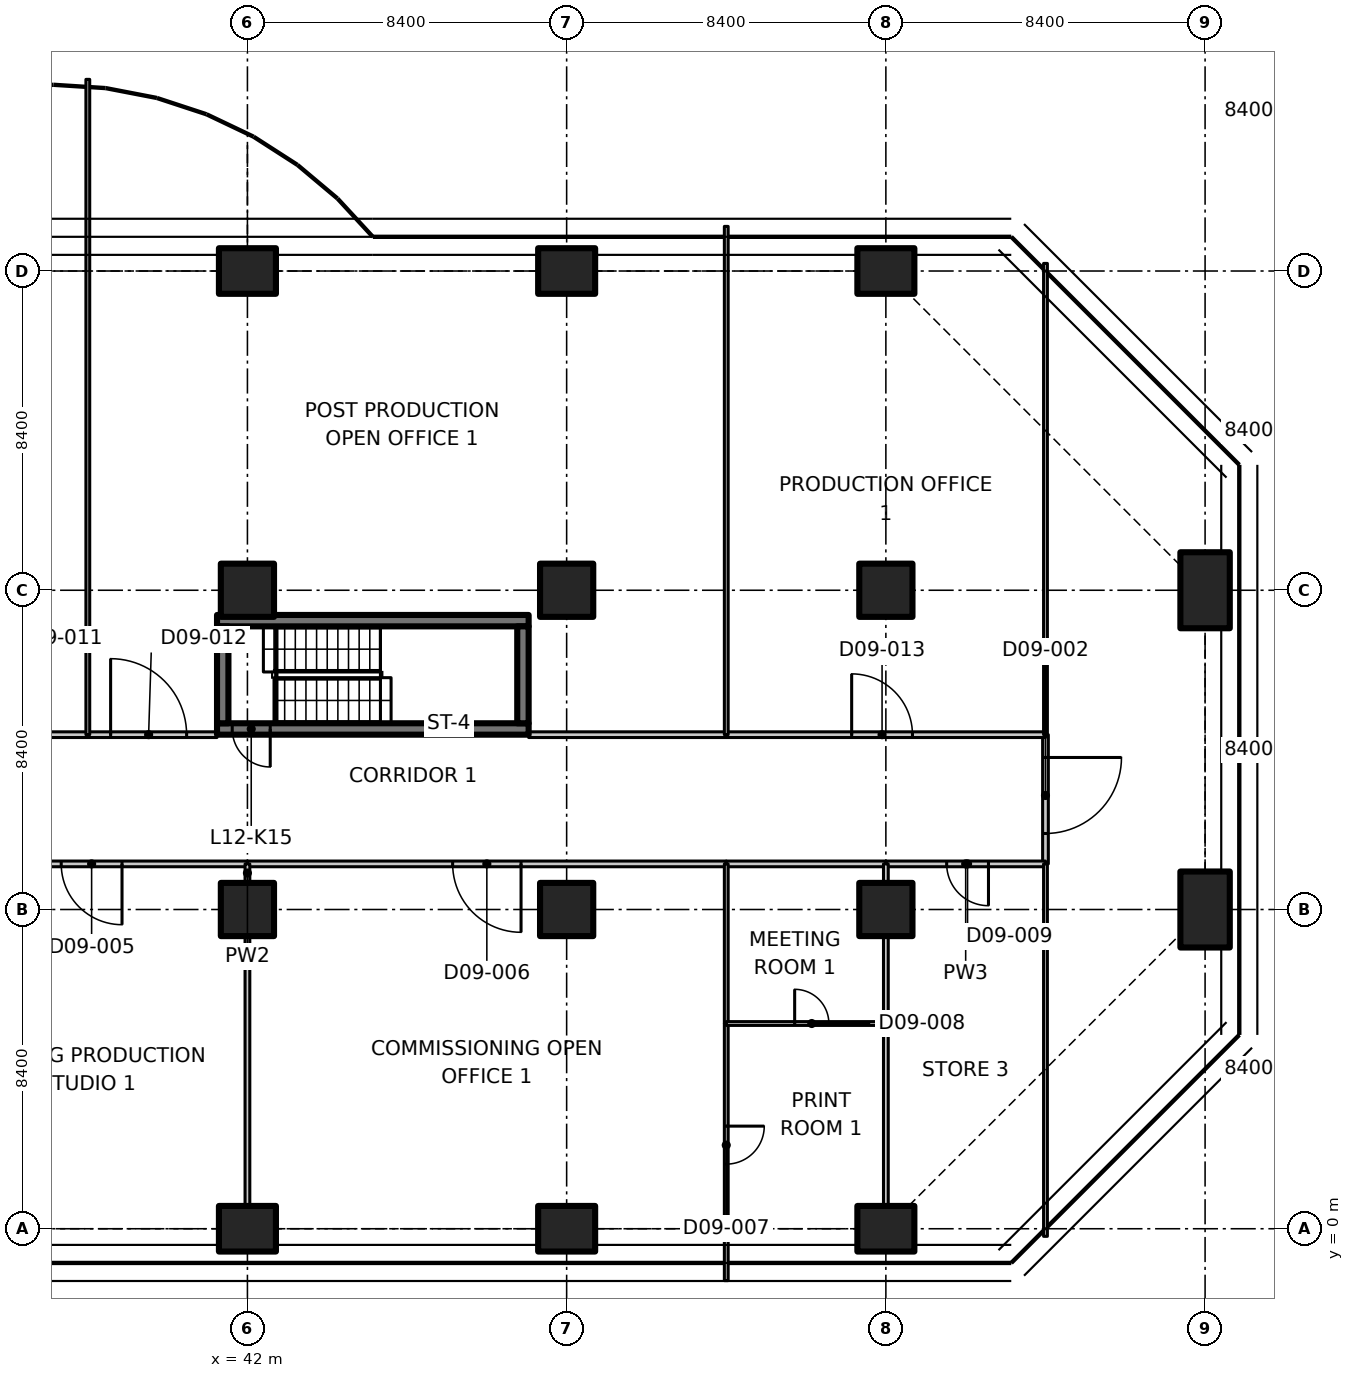
"""IFC4 building model, lengths in metres.
Left out: names, types, materials, properties, quantities, classifications, styles, units other than length and angle.
Written with IfcOpenShell. Run it as: python <this file> out.ifc"""

import sys

from ifc_helpers import new_model, si_unit, direction, frame, frame_2d, origin, origin_2d, place, context, subcontext, project, spatial, polyline, rectangle, outline, extrude, element, fill, save


model = new_model("IFC4")
c1 = context("Model", 3, precision=1e-05, world=origin(), true_north=direction((0.0, 1.0)))
c2 = subcontext(c1, "Body", "Model", "MODEL_VIEW")
j1 = project(units=[si_unit("LENGTHUNIT", "METRE"), si_unit("PLANEANGLEUNIT", "RADIAN")], contexts=[c1])
p1 = place(None, origin())
s1 = spatial("IfcSite", under=j1, at=p1, CompositionType="ELEMENT")
p2 = place(p1, origin())
s2 = spatial("IfcBuilding", under=s1, at=p2, CompositionType="ELEMENT")
p3 = place(p2, frame((0.0, 0.0, 58.1)))
s3 = spatial("IfcBuildingStorey", under=s2, at=p3, CompositionType="ELEMENT", Elevation=58.1)
p4 = place(p3, frame((42.0, 0.0, 0.0), z_axis=(0.0, 0.0, 1.0), x_axis=(0.0, 1.0, 0.0)))
e1 = element("IfcColumn", 1, at=p4, inside=s3, PredefinedType="COLUMN", context=c2, shape_type="SweptSolid", body=[
    extrude(rectangle(XDim=1.2, YDim=1.5, at=origin_2d()), origin(), (0.0, 0.0, 1.0), 3.35),
])
for number, where, z_axis, x_axis in (
    (2, (42.0, 8.4, 0.0), (0.0, 0.0, 1.0), (1.0, 0.0, 0.0)),
    (3, (42.0, 16.8, 0.0), (0.0, 0.0, 1.0), (1.0, 0.0, 0.0)),
):
    element("IfcColumn", number, at=place(p3, frame(where, z_axis=z_axis, x_axis=x_axis)), inside=s3, PredefinedType="COLUMN", context=c2, shape_type="SweptSolid", body=[
        extrude(rectangle(XDim=1.4, YDim=1.4, at=origin_2d()), origin(), (0.0, 0.0, 1.0), 3.35),
    ])
for number, where, z_axis, x_axis in (
    (4, (42.0, 25.2, 0.0), (0.0, 0.0, 1.0), (0.0, 1.0, 0.0)),
    (5, (50.4, 0.0, 0.0), (0.0, 0.0, 1.0), (0.0, 1.0, 0.0)),
):
    element("IfcColumn", number, at=place(p3, frame(where, z_axis=z_axis, x_axis=x_axis)), inside=s3, PredefinedType="COLUMN", context=c2, shape_type="SweptSolid", body=[
        extrude(rectangle(XDim=1.2, YDim=1.5, at=origin_2d()), origin(), (0.0, 0.0, 1.0), 3.35),
    ])
for number, where, z_axis, x_axis in (
    (6, (50.4, 8.4, 0.0), (0.0, 0.0, 1.0), (1.0, 0.0, 0.0)),
    (7, (50.4, 16.8, 0.0), (0.0, 0.0, 1.0), (1.0, 0.0, 0.0)),
):
    element("IfcColumn", number, at=place(p3, frame(where, z_axis=z_axis, x_axis=x_axis)), inside=s3, PredefinedType="COLUMN", context=c2, shape_type="SweptSolid", body=[
        extrude(rectangle(XDim=1.4, YDim=1.4, at=origin_2d()), origin(), (0.0, 0.0, 1.0), 3.35),
    ])
for number, where, z_axis, x_axis in (
    (8, (50.4, 25.2, 0.0), (0.0, 0.0, 1.0), (0.0, 1.0, 0.0)),
    (9, (58.8, 0.0, 0.0), (0.0, 0.0, 1.0), (0.0, 1.0, 0.0)),
):
    element("IfcColumn", number, at=place(p3, frame(where, z_axis=z_axis, x_axis=x_axis)), inside=s3, PredefinedType="COLUMN", context=c2, shape_type="SweptSolid", body=[
        extrude(rectangle(XDim=1.2, YDim=1.5, at=origin_2d()), origin(), (0.0, 0.0, 1.0), 3.35),
    ])
for number, where, z_axis, x_axis in (
    (10, (58.8, 8.4, 0.0), (0.0, 0.0, 1.0), (1.0, 0.0, 0.0)),
    (11, (58.8, 16.8, 0.0), (0.0, 0.0, 1.0), (1.0, 0.0, 0.0)),
):
    element("IfcColumn", number, at=place(p3, frame(where, z_axis=z_axis, x_axis=x_axis)), inside=s3, PredefinedType="COLUMN", context=c2, shape_type="SweptSolid", body=[
        extrude(rectangle(XDim=1.4, YDim=1.4, at=origin_2d()), origin(), (0.0, 0.0, 1.0), 3.35),
    ])
p5 = place(p3, frame((58.8, 25.2, 0.0), z_axis=(0.0, 0.0, 1.0), x_axis=(0.0, 1.0, 0.0)))
e12 = element("IfcColumn", 12, at=p5, inside=s3, PredefinedType="COLUMN", context=c2, shape_type="SweptSolid", body=[
    extrude(rectangle(XDim=1.2, YDim=1.5, at=origin_2d()), origin(), (0.0, 0.0, 1.0), 3.35),
])
for number, where, z_axis, x_axis in (
    (13, (67.2, 8.4, 0.0), (0.0, 0.0, 1.0), (1.0, 0.0, 0.0)),
    (14, (67.2, 16.8, 0.0), (0.0, 0.0, 1.0), (1.0, 0.0, 0.0)),
):
    element("IfcColumn", number, at=place(p3, frame(where, z_axis=z_axis, x_axis=x_axis)), inside=s3, PredefinedType="COLUMN", context=c2, shape_type="SweptSolid", body=[
        extrude(rectangle(XDim=1.3, YDim=2.0, at=origin_2d()), origin(), (0.0, 0.0, 1.0), 3.35),
    ])
p6 = place(p3, frame((49.4, 13.15, 0.0), z_axis=(0.0, 0.0, 1.0), x_axis=(-1.0, 0.0, 0.0)))
e15 = element("IfcWall", 15, at=p6, inside=s3, PredefinedType="SHEAR", context=c2, shape_type="SweptSolid", body=[
    extrude(rectangle(XDim=8.2, YDim=0.3, at=frame_2d((4.1, 0.0))), origin(), (0.0, 0.0, 1.0), 3.35),
])
p7 = place(p6, frame((6.8, 0.0, 0.0)))
e16 = element("IfcOpeningElement", 16, at=p7, cuts=e15, PredefinedType="OPENING", context=c2, shape_type="SweptSolid", body=[
    extrude(rectangle(XDim=1.0, YDim=2.1, at=frame_2d((0.5, 1.05))), frame((0.0, 0.16, 0.0), z_axis=(0.0, -1.0, 0.0), x_axis=(1.0, 0.0, 0.0)), (0.0, 0.0, 1.0), 0.32),
])
p8 = place(p3, frame((41.2, 16.0, 0.0), z_axis=(0.0, 0.0, 1.0), x_axis=(1.0, 0.0, 0.0)))
e17 = element("IfcWall", 17, at=p8, inside=s3, PredefinedType="SHEAR", context=c2, shape_type="SweptSolid", body=[
    extrude(rectangle(XDim=8.2, YDim=0.3, at=frame_2d((4.1, 0.0))), origin(), (0.0, 0.0, 1.0), 3.35),
])
for number, where, z_axis, x_axis in (
    (18, (41.35, 13.3, 0.0), (0.0, 0.0, 1.0), (0.0, 1.0, 0.0)),
    (19, (49.25, 13.3, 0.0), (0.0, 0.0, 1.0), (0.0, 1.0, 0.0)),
):
    element("IfcWall", number, at=place(p3, frame(where, z_axis=z_axis, x_axis=x_axis)), inside=s3, PredefinedType="SHEAR", context=c2, shape_type="SweptSolid", body=[
        extrude(rectangle(XDim=2.55, YDim=0.3, at=frame_2d((1.275, 0.0))), origin(), (0.0, 0.0, 1.0), 3.35),
    ])
p9 = place(p3, frame((63.0, 13.0, 0.0), z_axis=(0.0, 0.0, 1.0), x_axis=(0.0, -1.0, 0.0)))
e20 = element("IfcWall", 20, at=p9, inside=s3, PredefinedType="PARTITIONING", context=c2, shape_type="SweptSolid", body=[
    extrude(rectangle(XDim=3.4, YDim=0.15, at=frame_2d((1.7, 0.0))), origin(), (0.0, 0.0, 1.0), 3.33),
])
p10 = place(p9, frame((0.6, 0.0, 0.0)))
e21 = element("IfcOpeningElement", 21, at=p10, cuts=e20, PredefinedType="OPENING", context=c2, shape_type="SweptSolid", body=[
    extrude(rectangle(XDim=2.0, YDim=2.4, at=frame_2d((1.0, 1.2))), frame((0.0, 0.085, 0.0), z_axis=(0.0, -1.0, 0.0), x_axis=(1.0, 0.0, 0.0)), (0.0, 0.0, 1.0), 0.17),
])
p11 = place(p3, frame((42.0, 9.6, 0.0), z_axis=(0.0, 0.0, 1.0), x_axis=(-1.0, 0.0, 0.0)))
e22 = element("IfcWall", 22, at=p11, inside=s3, PredefinedType="PARTITIONING", context=c2, shape_type="SweptSolid", body=[
    extrude(rectangle(XDim=8.4, YDim=0.15, at=frame_2d((4.2, 0.0))), origin(), (0.0, 0.0, 1.0), 3.33),
])
p12 = place(p11, frame((3.3, 0.0, 0.0)))
e23 = element("IfcOpeningElement", 23, at=p12, cuts=e22, PredefinedType="OPENING", context=c2, shape_type="SweptSolid", body=[
    extrude(rectangle(XDim=1.6, YDim=2.1, at=frame_2d((0.8, 1.05))), frame((0.0, 0.085, 0.0), z_axis=(0.0, -1.0, 0.0), x_axis=(1.0, 0.0, 0.0)), (0.0, 0.0, 1.0), 0.17),
])
p13 = place(p3, frame((54.6, 9.6, 0.0), z_axis=(0.0, 0.0, 1.0), x_axis=(-1.0, 0.0, 0.0)))
e24 = element("IfcWall", 24, at=p13, inside=s3, PredefinedType="PARTITIONING", context=c2, shape_type="SweptSolid", body=[
    extrude(rectangle(XDim=12.6, YDim=0.15, at=frame_2d((6.3, 0.0))), origin(), (0.0, 0.0, 1.0), 3.33),
])
p14 = place(p13, frame((5.4, 0.0, 0.0)))
e25 = element("IfcOpeningElement", 25, at=p14, cuts=e24, PredefinedType="OPENING", context=c2, shape_type="SweptSolid", body=[
    extrude(rectangle(XDim=1.8, YDim=2.1, at=frame_2d((0.9, 1.05))), frame((0.0, 0.085, 0.0), z_axis=(0.0, -1.0, 0.0), x_axis=(1.0, 0.0, 0.0)), (0.0, 0.0, 1.0), 0.17),
])
p15 = place(p3, frame((58.8, 9.6, 0.0), z_axis=(0.0, 0.0, 1.0), x_axis=(-1.0, 0.0, 0.0)))
e26 = element("IfcWall", 26, at=p15, inside=s3, PredefinedType="PARTITIONING", context=c2, shape_type="SweptSolid", body=[
    extrude(rectangle(XDim=4.2, YDim=0.15, at=frame_2d((2.1, 0.0))), origin(), (0.0, 0.0, 1.0), 3.33),
])
p16 = place(p3, frame((63.0, 9.6, 0.0), z_axis=(0.0, 0.0, 1.0), x_axis=(-1.0, 0.0, 0.0)))
e27 = element("IfcWall", 27, at=p16, inside=s3, PredefinedType="PARTITIONING", context=c2, shape_type="SweptSolid", body=[
    extrude(rectangle(XDim=4.2, YDim=0.15, at=frame_2d((2.1, 0.0))), origin(), (0.0, 0.0, 1.0), 3.33),
])
p17 = place(p16, frame((1.5, 0.0, 0.0)))
e28 = element("IfcOpeningElement", 28, at=p17, cuts=e27, PredefinedType="OPENING", context=c2, shape_type="SweptSolid", body=[
    extrude(rectangle(XDim=1.1, YDim=2.1, at=frame_2d((0.55, 1.05))), frame((0.0, 0.085, 0.0), z_axis=(0.0, -1.0, 0.0), x_axis=(1.0, 0.0, 0.0)), (0.0, 0.0, 1.0), 0.17),
])
p18 = place(p3, frame((33.6, 13.0, 0.0), z_axis=(0.0, 0.0, 1.0), x_axis=(1.0, 0.0, 0.0)))
e29 = element("IfcWall", 29, at=p18, inside=s3, PredefinedType="PARTITIONING", context=c2, shape_type="SweptSolid", body=[
    extrude(rectangle(XDim=4.2, YDim=0.15, at=frame_2d((2.1, 0.0))), origin(), (0.0, 0.0, 1.0), 3.33),
])
p19 = place(p18, frame((1.2, 0.0, 0.0)))
e30 = element("IfcOpeningElement", 30, at=p19, cuts=e29, PredefinedType="OPENING", context=c2, shape_type="SweptSolid", body=[
    extrude(rectangle(XDim=1.6, YDim=2.1, at=frame_2d((0.8, 1.05))), frame((0.0, 0.085, 0.0), z_axis=(0.0, -1.0, 0.0), x_axis=(1.0, 0.0, 0.0)), (0.0, 0.0, 1.0), 0.17),
])
p20 = place(p3, frame((37.8, 13.0, 0.0), z_axis=(0.0, 0.0, 1.0), x_axis=(1.0, 0.0, 0.0)))
e31 = element("IfcWall", 31, at=p20, inside=s3, PredefinedType="PARTITIONING", context=c2, shape_type="SweptSolid", body=[
    extrude(rectangle(XDim=3.4, YDim=0.15, at=frame_2d((1.7, 0.0))), origin(), (0.0, 0.0, 1.0), 3.33),
])
p21 = place(p20, frame((0.6, 0.0, 0.0)))
e32 = element("IfcOpeningElement", 32, at=p21, cuts=e31, PredefinedType="OPENING", context=c2, shape_type="SweptSolid", body=[
    extrude(rectangle(XDim=2.0, YDim=2.4, at=frame_2d((1.0, 1.2))), frame((0.0, 0.085, 0.0), z_axis=(0.0, -1.0, 0.0), x_axis=(1.0, 0.0, 0.0)), (0.0, 0.0, 1.0), 0.17),
])
p22 = place(p3, frame((49.4, 13.0, 0.0), z_axis=(0.0, 0.0, 1.0), x_axis=(1.0, 0.0, 0.0)))
e33 = element("IfcWall", 33, at=p22, inside=s3, PredefinedType="PARTITIONING", context=c2, shape_type="SweptSolid", body=[
    extrude(rectangle(XDim=5.2, YDim=0.15, at=frame_2d((2.6, 0.0))), origin(), (0.0, 0.0, 1.0), 3.33),
])
p23 = place(p3, frame((54.6, 13.0, 0.0), z_axis=(0.0, 0.0, 1.0), x_axis=(1.0, 0.0, 0.0)))
e34 = element("IfcWall", 34, at=p23, inside=s3, PredefinedType="PARTITIONING", context=c2, shape_type="SweptSolid", body=[
    extrude(rectangle(XDim=8.4, YDim=0.15, at=frame_2d((4.2, 0.0))), origin(), (0.0, 0.0, 1.0), 3.33),
])
p24 = place(p23, frame((3.3, 0.0, 0.0)))
e35 = element("IfcOpeningElement", 35, at=p24, cuts=e34, PredefinedType="OPENING", context=c2, shape_type="SweptSolid", body=[
    extrude(rectangle(XDim=1.6, YDim=2.1, at=frame_2d((0.8, 1.05))), frame((0.0, 0.085, 0.0), z_axis=(0.0, -1.0, 0.0), x_axis=(1.0, 0.0, 0.0)), (0.0, 0.0, 1.0), 0.17),
])
p25 = place(p3, frame((63.0, -0.2, 0.0), z_axis=(0.0, 0.0, 1.0), x_axis=(0.0, 1.0, 0.0)))
e36 = element("IfcWall", 36, at=p25, inside=s3, PredefinedType="PARTITIONING", context=c2, shape_type="SweptSolid", body=[
    extrude(outline(polyline([(0.0, 0.0), (9.8, 0.0), (9.8, 3.33), (5.066, 3.33), (5.064, 2.98), (3.736, 2.98), (3.734, 3.33), (0.0, 3.33), (0.0, 0.0)])), frame((0.0, 0.05, 0.0), z_axis=(0.0, -1.0, 0.0), x_axis=(1.0, 0.0, 0.0)), (0.0, 0.0, 1.0), 0.1),
])
p26 = place(p3, frame((63.0, 13.0, 0.0), z_axis=(0.0, 0.0, 1.0), x_axis=(0.0, 1.0, 0.0)))
e37 = element("IfcWall", 37, at=p26, inside=s3, PredefinedType="PARTITIONING", context=c2, shape_type="SweptSolid", body=[
    extrude(outline(polyline([(0.0, 0.0), (12.4, 0.0), (12.4, 3.33), (8.666, 3.33), (8.664, 2.98), (7.336, 2.98), (7.334, 3.33), (0.0, 3.33), (0.0, 0.0)])), frame((0.0, 0.05, 0.0), z_axis=(0.0, -1.0, 0.0), x_axis=(1.0, 0.0, 0.0)), (0.0, 0.0, 1.0), 0.1),
])
p27 = place(p3, frame((42.0, 9.6, 0.0), z_axis=(0.0, 0.0, 1.0), x_axis=(0.0, -1.0, 0.0)))
e38 = element("IfcWall", 38, at=p27, inside=s3, PredefinedType="PARTITIONING", context=c2, shape_type="SweptSolid", body=[
    extrude(rectangle(XDim=0.48, YDim=0.125, at=frame_2d((0.24, 0.0))), origin(), (0.0, 0.0, 1.0), 3.33),
])
p28 = place(p3, frame((42.0, 7.68, 0.0), z_axis=(0.0, 0.0, 1.0), x_axis=(0.0, -1.0, 0.0)))
e39 = element("IfcWall", 39, at=p28, inside=s3, PredefinedType="PARTITIONING", context=c2, shape_type="SweptSolid", body=[
    extrude(rectangle(XDim=7.06, YDim=0.125, at=frame_2d((3.53, 0.0))), origin(), (0.0, 0.0, 1.0), 3.33),
])
p29 = place(p3, frame((54.6, 5.4, 0.0), z_axis=(0.0, 0.0, 1.0), x_axis=(0.0, -1.0, 0.0)))
e40 = element("IfcWall", 40, at=p29, inside=s3, PredefinedType="PARTITIONING", context=c2, shape_type="SweptSolid", body=[
    extrude(outline(polyline([(0.0, 0.0), (6.765, 0.0), (6.765, 3.33), (6.5, 3.33), (5.85, 3.33), (5.848, 2.98), (4.952, 2.98), (4.95, 3.33), (0.0, 3.33), (0.0, 0.0)])), frame((0.0, 0.05, 0.0), z_axis=(0.0, -1.0, 0.0), x_axis=(1.0, 0.0, 0.0)), (0.0, 0.0, 1.0), 0.1),
])
p30 = place(p29, frame((2.7, 0.0, 0.0)))
e41 = element("IfcOpeningElement", 41, at=p30, cuts=e40, PredefinedType="OPENING", context=c2, shape_type="SweptSolid", body=[
    extrude(rectangle(XDim=1.0, YDim=2.1, at=frame_2d((0.5, 1.05))), frame((0.0, 0.06, 0.0), z_axis=(0.0, -1.0, 0.0), x_axis=(1.0, 0.0, 0.0)), (0.0, 0.0, 1.0), 0.12),
])
p31 = place(p3, frame((54.6, 9.6, 0.0), z_axis=(0.0, 0.0, 1.0), x_axis=(0.0, -1.0, 0.0)))
e42 = element("IfcWall", 42, at=p31, inside=s3, PredefinedType="PARTITIONING", context=c2, shape_type="SweptSolid", body=[
    extrude(rectangle(XDim=4.2, YDim=0.1, at=frame_2d((2.1, 0.0))), origin(), (0.0, 0.0, 1.0), 3.33),
])
p32 = place(p3, frame((54.6, 5.4, 0.0), z_axis=(0.0, 0.0, 1.0), x_axis=(1.0, 0.0, 0.0)))
e43 = element("IfcWall", 43, at=p32, inside=s3, PredefinedType="PARTITIONING", context=c2, shape_type="SweptSolid", body=[
    extrude(rectangle(XDim=4.2, YDim=0.1, at=frame_2d((2.1, 0.0))), origin(), (0.0, 0.0, 1.0), 3.33),
])
p33 = place(p32, frame((1.8, 0.0, 0.0)))
e44 = element("IfcOpeningElement", 44, at=p33, cuts=e43, PredefinedType="OPENING", context=c2, shape_type="SweptSolid", body=[
    extrude(rectangle(XDim=0.9, YDim=2.1, at=frame_2d((0.45, 1.05))), frame((0.0, 0.06, 0.0), z_axis=(0.0, -1.0, 0.0), x_axis=(1.0, 0.0, 0.0)), (0.0, 0.0, 1.0), 0.12),
])
p34 = place(p3, frame((58.8, 5.4, 0.0), z_axis=(0.0, 0.0, 1.0), x_axis=(0.0, -1.0, 0.0)))
e45 = element("IfcWall", 45, at=p34, inside=s3, PredefinedType="PARTITIONING", context=c2, shape_type="SweptSolid", body=[
    extrude(rectangle(XDim=4.78, YDim=0.125, at=frame_2d((2.39, 0.0))), origin(), (0.0, 0.0, 1.0), 3.33),
])
p35 = place(p3, frame((58.8, 9.6, 0.0), z_axis=(0.0, 0.0, 1.0), x_axis=(0.0, -1.0, 0.0)))
e46 = element("IfcWall", 46, at=p35, inside=s3, PredefinedType="PARTITIONING", context=c2, shape_type="SweptSolid", body=[
    extrude(rectangle(XDim=0.48, YDim=0.125, at=frame_2d((0.24, 0.0))), origin(), (0.0, 0.0, 1.0), 3.33),
])
p36 = place(p3, frame((58.8, 7.68, 0.0), z_axis=(0.0, 0.0, 1.0), x_axis=(0.0, -1.0, 0.0)))
e47 = element("IfcWall", 47, at=p36, inside=s3, PredefinedType="PARTITIONING", context=c2, shape_type="SweptSolid", body=[
    extrude(rectangle(XDim=2.28, YDim=0.125, at=frame_2d((1.14, 0.0))), origin(), (0.0, 0.0, 1.0), 3.33),
])
p37 = place(p3, frame((37.8, 30.243, 0.0), z_axis=(0.0, 0.0, 1.0), x_axis=(0.0, -1.0, 0.0)))
e48 = element("IfcWall", 48, at=p37, inside=s3, PredefinedType="PARTITIONING", context=c2, shape_type="SweptSolid", body=[
    extrude(outline(polyline([(0.0, 0.0), (17.243, 0.0), (17.243, 3.33), (5.493, 3.33), (5.491, 2.98), (4.595, 2.98), (4.593, 3.33), (0.0, 3.33), (0.0, 0.0)])), frame((0.0, 0.05, 0.0), z_axis=(0.0, -1.0, 0.0), x_axis=(1.0, 0.0, 0.0)), (0.0, 0.0, 1.0), 0.1),
])
p38 = place(p3, frame((54.6, 26.374, 0.0), z_axis=(0.0, 0.0, 1.0), x_axis=(0.0, -1.0, 0.0)))
e49 = element("IfcWall", 49, at=p38, inside=s3, PredefinedType="PARTITIONING", context=c2, shape_type="SweptSolid", body=[
    extrude(outline(polyline([(0.0, 0.0), (13.374, 0.0), (13.374, 3.33), (1.624, 3.33), (1.622, 2.98), (0.726, 2.98), (0.724, 3.33), (0.074, 3.33), (0.0, 3.33), (0.0, 0.0)])), frame((0.0, 0.05, 0.0), z_axis=(0.0, -1.0, 0.0), x_axis=(1.0, 0.0, 0.0)), (0.0, 0.0, 1.0), 0.1),
])
p39 = place(p7, origin())
e50 = element("IfcDoor", 50, at=p39, inside=s3, OperationType="SINGLE_SWING_RIGHT", PredefinedType="DOOR", context=c2, shape_type="SweptSolid", body=[
    extrude(rectangle(XDim=1.0, YDim=2.1, at=frame_2d((0.5, 1.05))), frame((0.0, 0.025, 0.0), z_axis=(0.0, -1.0, 0.0), x_axis=(1.0, 0.0, 0.0)), (0.0, 0.0, 1.0), 0.05),
])
fill(e16, e50)
p40 = place(p10, origin())
e51 = element("IfcDoor", 51, at=p40, inside=s3, OperationType="DOUBLE_DOOR_SINGLE_SWING", PredefinedType="DOOR", context=c2, shape_type="SweptSolid", body=[
    extrude(rectangle(XDim=2.0, YDim=2.4, at=frame_2d((1.0, 1.2))), frame((0.0, 0.025, 0.0), z_axis=(0.0, -1.0, 0.0), x_axis=(1.0, 0.0, 0.0)), (0.0, 0.0, 1.0), 0.05),
])
fill(e21, e51)
p41 = place(p12, origin())
e52 = element("IfcDoor", 52, at=p41, inside=s3, OperationType="DOUBLE_DOOR_SINGLE_SWING", PredefinedType="DOOR", context=c2, shape_type="SweptSolid", body=[
    extrude(rectangle(XDim=1.6, YDim=2.1, at=frame_2d((0.8, 1.05))), frame((0.0, 0.025, 0.0), z_axis=(0.0, -1.0, 0.0), x_axis=(1.0, 0.0, 0.0)), (0.0, 0.0, 1.0), 0.05),
])
fill(e23, e52)
p42 = place(p14, origin())
e53 = element("IfcDoor", 53, at=p42, inside=s3, OperationType="DOUBLE_DOOR_SINGLE_SWING", PredefinedType="DOOR", context=c2, shape_type="SweptSolid", body=[
    extrude(rectangle(XDim=1.8, YDim=2.1, at=frame_2d((0.9, 1.05))), frame((0.0, 0.025, 0.0), z_axis=(0.0, -1.0, 0.0), x_axis=(1.0, 0.0, 0.0)), (0.0, 0.0, 1.0), 0.05),
])
fill(e25, e53)
p43 = place(p30, origin())
e54 = element("IfcDoor", 54, at=p43, inside=s3, OperationType="SINGLE_SWING_LEFT", PredefinedType="DOOR", context=c2, shape_type="SweptSolid", body=[
    extrude(rectangle(XDim=1.0, YDim=2.1, at=frame_2d((0.5, 1.05))), frame((0.0, 0.025, 0.0), z_axis=(0.0, -1.0, 0.0), x_axis=(1.0, 0.0, 0.0)), (0.0, 0.0, 1.0), 0.05),
])
fill(e41, e54)
p44 = place(p33, origin())
e55 = element("IfcDoor", 55, at=p44, inside=s3, OperationType="SINGLE_SWING_LEFT", PredefinedType="DOOR", context=c2, shape_type="SweptSolid", body=[
    extrude(rectangle(XDim=0.9, YDim=2.1, at=frame_2d((0.45, 1.05))), frame((0.0, 0.025, 0.0), z_axis=(0.0, -1.0, 0.0), x_axis=(1.0, 0.0, 0.0)), (0.0, 0.0, 1.0), 0.05),
])
fill(e44, e55)
p45 = place(p17, origin())
e56 = element("IfcDoor", 56, at=p45, inside=s3, OperationType="SINGLE_SWING_LEFT", PredefinedType="DOOR", context=c2, shape_type="SweptSolid", body=[
    extrude(rectangle(XDim=1.1, YDim=2.1, at=frame_2d((0.55, 1.05))), frame((0.0, 0.025, 0.0), z_axis=(0.0, -1.0, 0.0), x_axis=(1.0, 0.0, 0.0)), (0.0, 0.0, 1.0), 0.05),
])
fill(e28, e56)
p46 = place(p21, origin())
e57 = element("IfcDoor", 57, at=p46, inside=s3, OperationType="DOUBLE_DOOR_SINGLE_SWING", PredefinedType="DOOR", context=c2, shape_type="SweptSolid", body=[
    extrude(rectangle(XDim=2.0, YDim=2.4, at=frame_2d((1.0, 1.2))), frame((0.0, 0.025, 0.0), z_axis=(0.0, -1.0, 0.0), x_axis=(1.0, 0.0, 0.0)), (0.0, 0.0, 1.0), 0.05),
])
fill(e32, e57)
p47 = place(p24, origin())
e58 = element("IfcDoor", 58, at=p47, inside=s3, OperationType="DOUBLE_DOOR_SINGLE_SWING", PredefinedType="DOOR", context=c2, shape_type="SweptSolid", body=[
    extrude(rectangle(XDim=1.6, YDim=2.1, at=frame_2d((0.8, 1.05))), frame((0.0, 0.025, 0.0), z_axis=(0.0, -1.0, 0.0), x_axis=(1.0, 0.0, 0.0)), (0.0, 0.0, 1.0), 0.05),
])
fill(e35, e58)
save(model, sys.argv[1])
